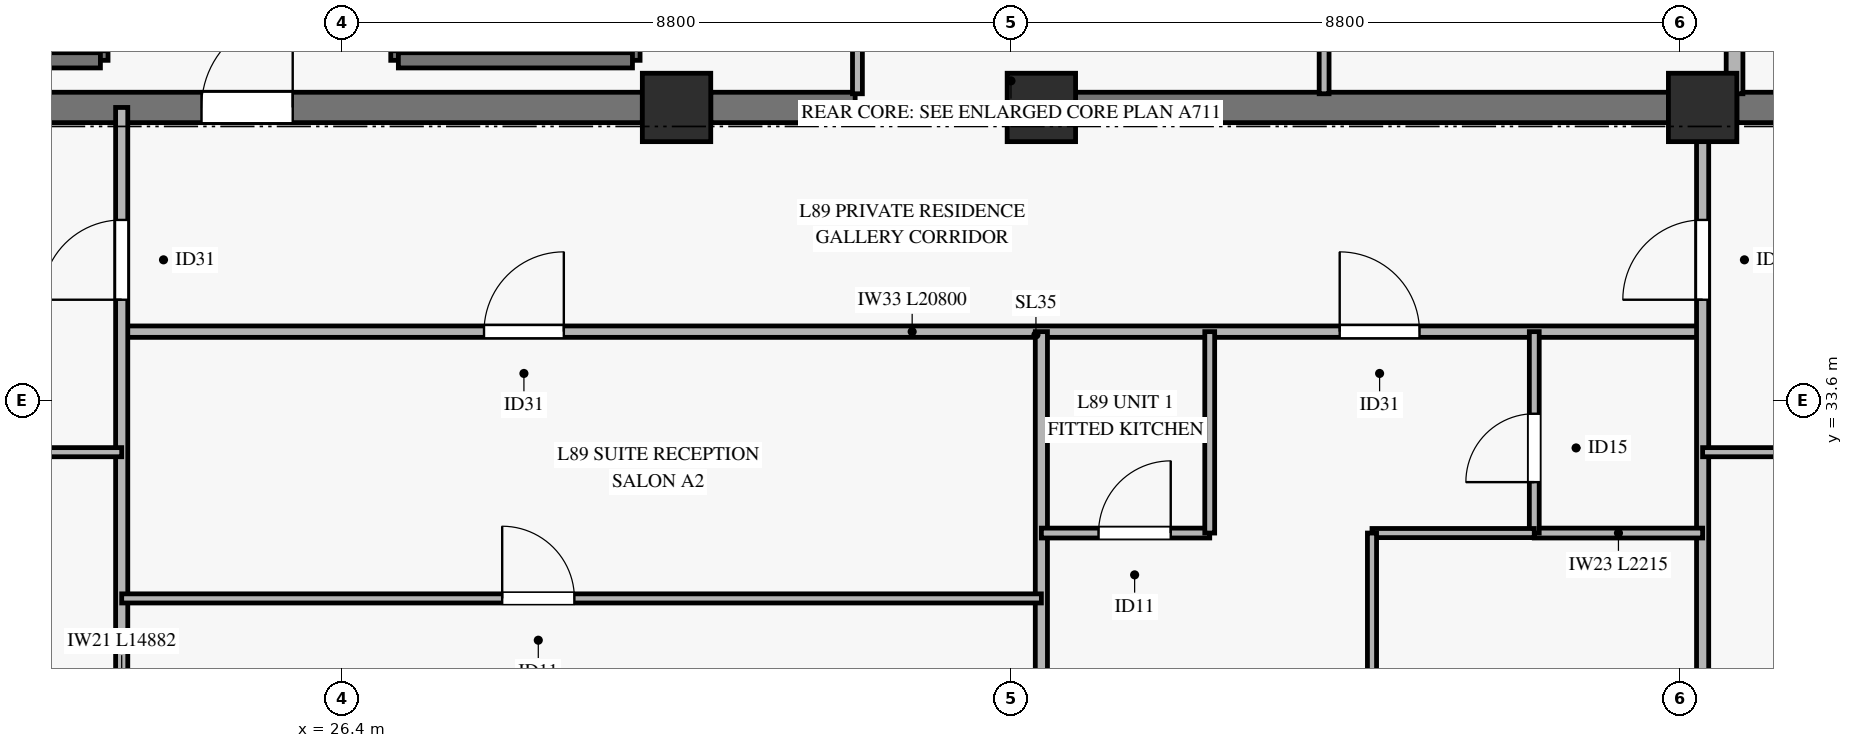
"""IFC4 building model, lengths in metres.
Left out: names, types, materials, properties, quantities, classifications, styles, units other than length and angle.
Written with IfcOpenShell. Run it as: python <this file> out.ifc"""

import sys

from ifc_helpers import new_model, si_unit, direction, frame, frame_2d, origin, origin_2d, place, context, subcontext, project, spatial, rectangle, extrude, source, transform, mapped, element, fill, save


model = new_model("IFC4")
c1 = context("Model", 3, precision=1e-05, world=origin(), true_north=direction((0.0, 1.0)))
c2 = subcontext(c1, "Body", "Model", "MODEL_VIEW")
j1 = project(units=[si_unit("LENGTHUNIT", "METRE"), si_unit("PLANEANGLEUNIT", "RADIAN")], contexts=[c1])
p1 = place(None, origin())
s1 = spatial("IfcSite", under=j1, at=p1, CompositionType="ELEMENT")
p2 = place(p1, origin())
s2 = spatial("IfcBuilding", under=s1, at=p2, CompositionType="ELEMENT")
p3 = place(p2, frame((0.0, 0.0, 342.5)))
s3 = spatial("IfcBuildingStorey", under=s2, at=p3, CompositionType="ELEMENT", Elevation=342.5)
m1 = source(origin(), c2, "Body", "SweptSolid", [
    extrude(rectangle(XDim=0.9, YDim=0.9, at=origin_2d()), origin(), (0.0, 0.0, 1.0), 3.185),
])
for number, where, z_axis, x_axis in (
    (1, (30.8, 37.45, 0.0), (0.0, 0.0, 1.0), (1.0, 0.0, 0.0)),
    (2, (35.6, 37.45, 0.0), (0.0, 0.0, 1.0), (1.0, 0.0, 0.0)),
    (3, (44.3, 37.45, 0.0), (0.0, 0.0, 1.0), (1.0, 0.0, 0.0)),
):
    element("IfcColumn", number, at=place(p3, frame(where, z_axis=z_axis, x_axis=x_axis)), inside=s3, PredefinedType="PILASTER", context=c2, shape_type="MappedRepresentation", body=[
        mapped(m1, transform((0.0, 0.0, 0.0), x_axis=(1.0, 0.0, 0.0), y_axis=(0.0, 1.0, 0.0), z_axis=(0.0, 0.0, 1.0), scale=1.0)),
    ])
p4 = place(p3, frame((20.3, 37.45, 0.0), z_axis=(0.0, 0.0, 1.0), x_axis=(1.0, 0.0, 0.0)))
e4 = element("IfcWall", 4, at=p4, inside=s3, PredefinedType="SHEAR", context=c2, shape_type="SweptSolid", body=[
    extrude(rectangle(XDim=10.05, YDim=0.4, at=frame_2d((5.025, 0.0))), origin(), (0.0, 0.0, 1.0), 3.185),
])
p5 = place(p4, frame((4.25, 0.0, 0.0)))
e5 = element("IfcOpeningElement", 5, at=p5, cuts=e4, PredefinedType="OPENING", context=c2, shape_type="SweptSolid", body=[
    extrude(rectangle(XDim=1.2, YDim=2.15, at=frame_2d((0.6, 1.075))), frame((0.0, 0.21, 0.0), z_axis=(0.0, -1.0, 0.0), x_axis=(1.0, 0.0, 0.0)), (0.0, 0.0, 1.0), 0.42),
])
p6 = place(p3, frame((31.25, 37.45, 0.0), z_axis=(0.0, 0.0, 1.0), x_axis=(1.0, 0.0, 0.0)))
e6 = element("IfcWall", 6, at=p6, inside=s3, PredefinedType="SHEAR", context=c2, shape_type="SweptSolid", body=[
    extrude(rectangle(XDim=1.9, YDim=0.4, at=frame_2d((0.95, 0.0))), origin(), (0.0, 0.0, 1.0), 3.185),
])
p7 = place(p3, frame((36.05, 37.45, 0.0), z_axis=(0.0, 0.0, 1.0), x_axis=(1.0, 0.0, 0.0)))
e7 = element("IfcWall", 7, at=p7, inside=s3, PredefinedType="SHEAR", context=c2, shape_type="SweptSolid", body=[
    extrude(rectangle(XDim=7.8, YDim=0.4, at=frame_2d((3.9, 0.0))), origin(), (0.0, 0.0, 1.0), 3.185),
])
p8 = place(p3, frame((44.75, 37.45, 0.0), z_axis=(0.0, 0.0, 1.0), x_axis=(1.0, 0.0, 0.0)))
e8 = element("IfcWall", 8, at=p8, inside=s3, PredefinedType="SHEAR", context=c2, shape_type="SweptSolid", body=[
    extrude(rectangle(XDim=5.35, YDim=0.4, at=frame_2d((2.675, 0.0))), origin(), (0.0, 0.0, 1.0), 3.185),
])
p9 = place(p8, frame((0.7, 0.0, 0.0)))
e9 = element("IfcOpeningElement", 9, at=p9, cuts=e8, PredefinedType="OPENING", context=c2, shape_type="SweptSolid", body=[
    extrude(rectangle(XDim=1.2, YDim=2.15, at=frame_2d((0.6, 1.075))), frame((0.0, 0.21, 0.0), z_axis=(0.0, -1.0, 0.0), x_axis=(1.0, 0.0, 0.0)), (0.0, 0.0, 1.0), 0.42),
])
p10 = place(p3, frame((23.22, 38.07, 0.0), z_axis=(0.0, 0.0, 1.0), x_axis=(0.0, 1.0, 0.0)))
e10 = element("IfcWall", 10, at=p10, inside=s3, PredefinedType="SOLIDWALL", context=c2, shape_type="SweptSolid", body=[
    extrude(rectangle(XDim=7.25, YDim=0.2, at=frame_2d((3.625, 0.0))), origin(), (0.0, 0.0, 1.0), 3.4),
])
p11 = place(p10, frame((0.11, 0.0, 0.0)))
e11 = element("IfcOpeningElement", 11, at=p11, cuts=e10, PredefinedType="OPENING", context=c2, shape_type="SweptSolid", body=[
    extrude(rectangle(XDim=1.1, YDim=2.15, at=frame_2d((0.55, 1.075))), frame((0.0, 0.11, 0.0), z_axis=(0.0, -1.0, 0.0), x_axis=(1.0, 0.0, 0.0)), (0.0, 0.0, 1.0), 0.22),
])
p12 = place(p3, frame((20.17, 38.07, 0.0), z_axis=(0.0, 0.0, 1.0), x_axis=(1.0, 0.0, 0.0)))
e12 = element("IfcWall", 12, at=p12, inside=s3, PredefinedType="SOLIDWALL", context=c2, shape_type="SweptSolid", body=[
    extrude(rectangle(XDim=3.05, YDim=0.2, at=frame_2d((1.525, 0.0))), origin(), (0.0, 0.0, 1.0), 3.4),
])
p13 = place(p3, frame((27.14, 38.07, 0.0), z_axis=(0.0, 0.0, 1.0), x_axis=(0.0, 1.0, 0.0)))
e13 = element("IfcWall", 13, at=p13, inside=s3, PredefinedType="SOLIDWALL", context=c2, shape_type="SweptSolid", body=[
    extrude(rectangle(XDim=7.25, YDim=0.2, at=frame_2d((3.625, 0.0))), origin(), (0.0, 0.0, 1.0), 3.4),
])
p14 = place(p13, frame((0.11, 0.0, 0.0)))
e14 = element("IfcOpeningElement", 14, at=p14, cuts=e13, PredefinedType="OPENING", context=c2, shape_type="SweptSolid", body=[
    extrude(rectangle(XDim=1.1, YDim=2.15, at=frame_2d((0.55, 1.075))), frame((0.0, 0.11, 0.0), z_axis=(0.0, -1.0, 0.0), x_axis=(1.0, 0.0, 0.0)), (0.0, 0.0, 1.0), 0.22),
])
p15 = place(p3, frame((30.22, 38.07, 0.0), z_axis=(0.0, 0.0, 1.0), x_axis=(0.0, 1.0, 0.0)))
e15 = element("IfcWall", 15, at=p15, inside=s3, PredefinedType="SOLIDWALL", context=c2, shape_type="SweptSolid", body=[
    extrude(rectangle(XDim=7.25, YDim=0.2, at=frame_2d((3.625, 0.0))), origin(), (0.0, 0.0, 1.0), 3.4),
])
p16 = place(p3, frame((27.14, 38.07, 0.0), z_axis=(0.0, 0.0, 1.0), x_axis=(1.0, 0.0, 0.0)))
e16 = element("IfcWall", 16, at=p16, inside=s3, PredefinedType="SOLIDWALL", context=c2, shape_type="SweptSolid", body=[
    extrude(rectangle(XDim=3.08, YDim=0.2, at=frame_2d((1.54, 0.0))), origin(), (0.0, 0.0, 1.0), 3.4),
])
p17 = place(p3, frame((44.72, 37.63, 0.0), z_axis=(0.0, 0.0, 1.0), x_axis=(0.0, 1.0, 0.0)))
e17 = element("IfcWall", 17, at=p17, inside=s3, PredefinedType="SOLIDWALL", context=c2, shape_type="SweptSolid", body=[
    extrude(rectangle(XDim=7.59, YDim=0.22, at=frame_2d((3.795, 0.0))), origin(), (0.0, 0.0, 1.0), 3.185),
])
p18 = place(p3, frame((33.18, 37.63, 0.0), z_axis=(0.0, 0.0, 1.0), x_axis=(0.0, 1.0, 0.0)))
e18 = element("IfcWall", 18, at=p18, inside=s3, PredefinedType="PARTITIONING", context=c2, shape_type="SweptSolid", body=[
    extrude(rectangle(XDim=6.52, YDim=0.13, at=frame_2d((3.26, 0.0))), origin(), (0.0, 0.0, 1.0), 2.27),
])
p19 = place(p18, frame((1.32, 0.0, 0.0)))
e19 = element("IfcOpeningElement", 19, at=p19, cuts=e18, PredefinedType="OPENING", context=c2, shape_type="SweptSolid", body=[
    extrude(rectangle(XDim=0.9, YDim=2.1, at=frame_2d((0.45, 1.05))), frame((0.0, 0.075, 0.0), z_axis=(0.0, -1.0, 0.0), x_axis=(1.0, 0.0, 0.0)), (0.0, 0.0, 1.0), 0.15),
])
p20 = place(p18, frame((4.62, 0.0, 0.0)))
e20 = element("IfcOpeningElement", 20, at=p20, cuts=e18, PredefinedType="OPENING", context=c2, shape_type="SweptSolid", body=[
    extrude(rectangle(XDim=0.9, YDim=2.1, at=frame_2d((0.45, 1.05))), frame((0.0, 0.075, 0.0), z_axis=(0.0, -1.0, 0.0), x_axis=(1.0, 0.0, 0.0)), (0.0, 0.0, 1.0), 0.15),
])
p21 = place(p3, frame((39.32, 37.63, 0.0), z_axis=(0.0, 0.0, 1.0), x_axis=(0.0, 1.0, 0.0)))
e21 = element("IfcWall", 21, at=p21, inside=s3, PredefinedType="PARTITIONING", context=c2, shape_type="SweptSolid", body=[
    extrude(rectangle(XDim=8.74, YDim=0.13, at=frame_2d((4.37, 0.0))), origin(), (0.0, 0.0, 1.0), 3.185),
])
p22 = place(p21, frame((4.89, 0.0, 0.0)))
e22 = element("IfcOpeningElement", 22, at=p22, cuts=e21, PredefinedType="OPENING", context=c2, shape_type="SweptSolid", body=[
    extrude(rectangle(XDim=0.9, YDim=2.1, at=frame_2d((0.45, 1.05))), frame((0.0, 0.075, 0.0), z_axis=(0.0, -1.0, 0.0), x_axis=(1.0, 0.0, 0.0)), (0.0, 0.0, 1.0), 0.15),
])
p23 = place(p3, frame((23.5, 34.5, 0.0), z_axis=(0.0, 0.0, 1.0), x_axis=(1.0, 0.0, 0.0)))
e23 = element("IfcWall", 23, at=p23, inside=s3, PredefinedType="PARTITIONING", context=c2, shape_type="SweptSolid", body=[
    extrude(rectangle(XDim=20.8, YDim=0.15, at=frame_2d((10.4, 0.0))), origin(), (0.0, 0.0, 1.0), 2.47),
])
p24 = place(p23, frame((4.767, 0.0, 0.0)))
e24 = element("IfcOpeningElement", 24, at=p24, cuts=e23, PredefinedType="OPENING", context=c2, shape_type="SweptSolid", body=[
    extrude(rectangle(XDim=1.05, YDim=2.15, at=frame_2d((0.525, 1.075))), frame((0.0, 0.085, 0.0), z_axis=(0.0, -1.0, 0.0), x_axis=(1.0, 0.0, 0.0)), (0.0, 0.0, 1.0), 0.17),
])
p25 = place(p23, frame((16.025, 0.0, 0.0)))
e25 = element("IfcOpeningElement", 25, at=p25, cuts=e23, PredefinedType="OPENING", context=c2, shape_type="SweptSolid", body=[
    extrude(rectangle(XDim=1.05, YDim=2.15, at=frame_2d((0.525, 1.075))), frame((0.0, 0.085, 0.0), z_axis=(0.0, -1.0, 0.0), x_axis=(1.0, 0.0, 0.0)), (0.0, 0.0, 1.0), 0.17),
])
p26 = place(p3, frame((23.5, 22.568, 0.0), z_axis=(0.0, 0.0, 1.0), x_axis=(0.0, 1.0, 0.0)))
e26 = element("IfcWall", 26, at=p26, inside=s3, PredefinedType="PARTITIONING", context=c2, shape_type="SweptSolid", body=[
    extrude(rectangle(XDim=14.882, YDim=0.16, at=frame_2d((7.441, 0.0))), origin(), (0.0, 0.0, 1.0), 2.77),
])
p27 = place(p26, frame((12.352, 0.0, 0.0)))
e27 = element("IfcOpeningElement", 27, at=p27, cuts=e26, PredefinedType="OPENING", context=c2, shape_type="SweptSolid", body=[
    extrude(rectangle(XDim=1.05, YDim=2.15, at=frame_2d((0.525, 1.075))), frame((0.0, 0.09, 0.0), z_axis=(0.0, -1.0, 0.0), x_axis=(1.0, 0.0, 0.0)), (0.0, 0.0, 1.0), 0.18),
])
p28 = place(p3, frame((35.6, 22.568, 0.0), z_axis=(0.0, 0.0, 1.0), x_axis=(0.0, 1.0, 0.0)))
e28 = element("IfcWall", 28, at=p28, inside=s3, PredefinedType="PARTITIONING", context=c2, shape_type="SweptSolid", body=[
    extrude(rectangle(XDim=11.932, YDim=0.16, at=frame_2d((5.966, 0.0))), origin(), (0.0, 0.0, 1.0), 2.77),
])
p29 = place(p3, frame((44.3, 22.568, 0.0), z_axis=(0.0, 0.0, 1.0), x_axis=(0.0, 1.0, 0.0)))
e29 = element("IfcWall", 29, at=p29, inside=s3, PredefinedType="PARTITIONING", context=c2, shape_type="SweptSolid", body=[
    extrude(rectangle(XDim=14.882, YDim=0.16, at=frame_2d((7.441, 0.0))), origin(), (0.0, 0.0, 1.0), 2.47),
])
p30 = place(p29, frame((12.352, 0.0, 0.0)))
e30 = element("IfcOpeningElement", 30, at=p30, cuts=e29, PredefinedType="OPENING", context=c2, shape_type="SweptSolid", body=[
    extrude(rectangle(XDim=1.05, YDim=2.15, at=frame_2d((0.525, 1.075))), frame((0.0, 0.09, 0.0), z_axis=(0.0, -1.0, 0.0), x_axis=(1.0, 0.0, 0.0)), (0.0, 0.0, 1.0), 0.18),
])
p31 = place(p3, frame((11.685, 32.914, 0.0), z_axis=(0.0, 0.0, 1.0), x_axis=(1.0, 0.0, 0.0)))
e31 = element("IfcWall", 31, at=p31, inside=s3, PredefinedType="PARTITIONING", context=c2, shape_type="SweptSolid", body=[
    extrude(rectangle(XDim=11.815, YDim=0.12, at=frame_2d((5.907, 0.0))), origin(), (0.0, 0.0, 1.0), 2.47),
])
p32 = place(p31, frame((5.261, 0.0, 0.0)))
e32 = element("IfcOpeningElement", 32, at=p32, cuts=e31, PredefinedType="OPENING", context=c2, shape_type="SweptSolid", body=[
    extrude(rectangle(XDim=0.95, YDim=2.1, at=frame_2d((0.475, 1.05))), frame((0.0, 0.07, 0.0), z_axis=(0.0, -1.0, 0.0), x_axis=(1.0, 0.0, 0.0)), (0.0, 0.0, 1.0), 0.14),
])
p33 = place(p3, frame((23.5, 30.99, 0.0), z_axis=(0.0, 0.0, 1.0), x_axis=(1.0, 0.0, 0.0)))
e33 = element("IfcWall", 33, at=p33, inside=s3, PredefinedType="PARTITIONING", context=c2, shape_type="SweptSolid", body=[
    extrude(rectangle(XDim=12.1, YDim=0.12, at=frame_2d((6.05, 0.0))), origin(), (0.0, 0.0, 1.0), 2.47),
])
p34 = place(p33, frame((5.006, 0.0, 0.0)))
e34 = element("IfcOpeningElement", 34, at=p34, cuts=e33, PredefinedType="OPENING", context=c2, shape_type="SweptSolid", body=[
    extrude(rectangle(XDim=0.95, YDim=2.1, at=frame_2d((0.475, 1.05))), frame((0.0, 0.07, 0.0), z_axis=(0.0, -1.0, 0.0), x_axis=(1.0, 0.0, 0.0)), (0.0, 0.0, 1.0), 0.14),
])
p35 = place(p3, frame((35.6, 31.85, 0.0), z_axis=(0.0, 0.0, 1.0), x_axis=(1.0, 0.0, 0.0)))
e35 = element("IfcWall", 35, at=p35, inside=s3, PredefinedType="PARTITIONING", context=c2, shape_type="SweptSolid", body=[
    extrude(rectangle(XDim=2.215, YDim=0.13, at=frame_2d((1.107, 0.0))), origin(), (0.0, 0.0, 1.0), 2.47),
])
p36 = place(p35, frame((0.752, 0.0, 0.0)))
e36 = element("IfcOpeningElement", 36, at=p36, cuts=e35, PredefinedType="OPENING", context=c2, shape_type="SweptSolid", body=[
    extrude(rectangle(XDim=0.95, YDim=2.1, at=frame_2d((0.475, 1.05))), frame((0.0, 0.075, 0.0), z_axis=(0.0, -1.0, 0.0), x_axis=(1.0, 0.0, 0.0)), (0.0, 0.0, 1.0), 0.15),
])
p37 = place(p3, frame((37.815, 31.85, 0.0), z_axis=(0.0, 0.0, 1.0), x_axis=(0.0, 1.0, 0.0)))
e37 = element("IfcWall", 37, at=p37, inside=s3, PredefinedType="PARTITIONING", context=c2, shape_type="SweptSolid", body=[
    extrude(rectangle(XDim=2.65, YDim=0.13, at=frame_2d((1.325, 0.0))), origin(), (0.0, 0.0, 1.0), 2.77),
])
p38 = place(p3, frame((42.085, 31.85, 0.0), z_axis=(0.0, 0.0, 1.0), x_axis=(1.0, 0.0, 0.0)))
e38 = element("IfcWall", 38, at=p38, inside=s3, PredefinedType="PARTITIONING", context=c2, shape_type="SweptSolid", body=[
    extrude(rectangle(XDim=2.215, YDim=0.13, at=frame_2d((1.107, 0.0))), origin(), (0.0, 0.0, 1.0), 2.47),
])
p39 = place(p3, frame((42.085, 31.85, 0.0), z_axis=(0.0, 0.0, 1.0), x_axis=(0.0, 1.0, 0.0)))
e39 = element("IfcWall", 39, at=p39, inside=s3, PredefinedType="PARTITIONING", context=c2, shape_type="SweptSolid", body=[
    extrude(rectangle(XDim=2.65, YDim=0.13, at=frame_2d((1.325, 0.0))), origin(), (0.0, 0.0, 1.0), 2.77),
])
p40 = place(p39, frame((0.67, 0.0, 0.0)))
e40 = element("IfcOpeningElement", 40, at=p40, cuts=e39, PredefinedType="OPENING", context=c2, shape_type="SweptSolid", body=[
    extrude(rectangle(XDim=0.9, YDim=2.1, at=frame_2d((0.45, 1.05))), frame((0.0, 0.075, 0.0), z_axis=(0.0, -1.0, 0.0), x_axis=(1.0, 0.0, 0.0)), (0.0, 0.0, 1.0), 0.15),
])
p41 = place(p3, frame((39.95, 31.85, 0.0), z_axis=(0.0, 0.0, 1.0), x_axis=(1.0, 0.0, 0.0)))
e41 = element("IfcWall", 41, at=p41, inside=s3, PredefinedType="PARTITIONING", context=c2, shape_type="SweptSolid", body=[
    extrude(rectangle(XDim=2.135, YDim=0.12, at=frame_2d((1.067, 0.0))), origin(), (0.0, 0.0, 1.0), 3.185),
])
p42 = place(p3, frame((39.95, 22.568, 0.0), z_axis=(0.0, 0.0, 1.0), x_axis=(0.0, 1.0, 0.0)))
e42 = element("IfcWall", 42, at=p42, inside=s3, PredefinedType="PARTITIONING", context=c2, shape_type="SweptSolid", body=[
    extrude(rectangle(XDim=9.282, YDim=0.12, at=frame_2d((4.641, 0.0))), origin(), (0.0, 0.0, 1.0), 2.77),
])
p43 = place(p42, frame((2.652, 0.0, 0.0)))
e43 = element("IfcOpeningElement", 43, at=p43, cuts=e42, PredefinedType="OPENING", context=c2, shape_type="SweptSolid", body=[
    extrude(rectangle(XDim=0.95, YDim=2.1, at=frame_2d((0.475, 1.05))), frame((0.0, 0.07, 0.0), z_axis=(0.0, -1.0, 0.0), x_axis=(1.0, 0.0, 0.0)), (0.0, 0.0, 1.0), 0.14),
])
p44 = place(p3, frame((44.3, 32.914, 0.0), z_axis=(0.0, 0.0, 1.0), x_axis=(1.0, 0.0, 0.0)))
e44 = element("IfcWall", 44, at=p44, inside=s3, PredefinedType="PARTITIONING", context=c2, shape_type="SweptSolid", body=[
    extrude(rectangle(XDim=14.415, YDim=0.12, at=frame_2d((7.208, 0.0))), origin(), (0.0, 0.0, 1.0), 2.47),
])
p45 = place(p44, frame((5.686, 0.0, 0.0)))
e45 = element("IfcOpeningElement", 45, at=p45, cuts=e44, PredefinedType="OPENING", context=c2, shape_type="SweptSolid", body=[
    extrude(rectangle(XDim=0.95, YDim=2.1, at=frame_2d((0.475, 1.05))), frame((0.0, 0.07, 0.0), z_axis=(0.0, -1.0, 0.0), x_axis=(1.0, 0.0, 0.0)), (0.0, 0.0, 1.0), 0.14),
])
m2 = source(origin(), c2, "Body", "SweptSolid", [
    extrude(rectangle(XDim=1.2, YDim=2.15, at=frame_2d((0.6, 1.075))), frame((0.0, 0.025, 0.0), z_axis=(0.0, -1.0, 0.0), x_axis=(1.0, 0.0, 0.0)), (0.0, 0.0, 1.0), 0.05),
])
p46 = place(p5, origin())
e46 = element("IfcDoor", 46, at=p46, inside=s3, OperationType="SINGLE_SWING_RIGHT", PredefinedType="DOOR", context=c2, shape_type="MappedRepresentation", body=[
    mapped(m2, transform((0.0, 0.0, 0.0), x_axis=(1.0, 0.0, 0.0), y_axis=(0.0, 1.0, 0.0), z_axis=(0.0, 0.0, 1.0), scale=1.0)),
])
fill(e5, e46)
m3 = source(origin(), c2, "Body", "SweptSolid", [
    extrude(rectangle(XDim=1.05, YDim=2.15, at=frame_2d((0.525, 1.075))), frame((0.0, 0.025, 0.0), z_axis=(0.0, -1.0, 0.0), x_axis=(1.0, 0.0, 0.0)), (0.0, 0.0, 1.0), 0.05),
])
p47 = place(p27, origin())
e47 = element("IfcDoor", 47, at=p47, inside=s3, OperationType="SINGLE_SWING_LEFT", PredefinedType="DOOR", context=c2, shape_type="MappedRepresentation", body=[
    mapped(m3, transform((0.0, 0.0, 0.0), x_axis=(1.0, 0.0, 0.0), y_axis=(0.0, 1.0, 0.0), z_axis=(0.0, 0.0, 1.0), scale=1.0)),
])
fill(e27, e47)
p48 = place(p24, origin())
e48 = element("IfcDoor", 48, at=p48, inside=s3, OperationType="SINGLE_SWING_RIGHT", PredefinedType="DOOR", context=c2, shape_type="MappedRepresentation", body=[
    mapped(m3, transform((0.0, 0.0, 0.0), x_axis=(1.0, 0.0, 0.0), y_axis=(0.0, 1.0, 0.0), z_axis=(0.0, 0.0, 1.0), scale=1.0)),
])
fill(e24, e48)
m4 = source(origin(), c2, "Body", "SweptSolid", [
    extrude(rectangle(XDim=0.95, YDim=2.1, at=frame_2d((0.475, 1.05))), frame((0.0, 0.025, 0.0), z_axis=(0.0, -1.0, 0.0), x_axis=(1.0, 0.0, 0.0)), (0.0, 0.0, 1.0), 0.05),
])
p49 = place(p34, origin())
e49 = element("IfcDoor", 49, at=p49, inside=s3, OperationType="SINGLE_SWING_LEFT", PredefinedType="DOOR", context=c2, shape_type="MappedRepresentation", body=[
    mapped(m4, transform((0.0, 0.0, 0.0), x_axis=(1.0, 0.0, 0.0), y_axis=(0.0, 1.0, 0.0), z_axis=(0.0, 0.0, 1.0), scale=1.0)),
])
fill(e34, e49)
p50 = place(p25, origin())
e50 = element("IfcDoor", 50, at=p50, inside=s3, OperationType="SINGLE_SWING_LEFT", PredefinedType="DOOR", context=c2, shape_type="MappedRepresentation", body=[
    mapped(m3, transform((0.0, 0.0, 0.0), x_axis=(1.0, 0.0, 0.0), y_axis=(0.0, 1.0, 0.0), z_axis=(0.0, 0.0, 1.0), scale=1.0)),
])
fill(e25, e50)
p51 = place(p36, origin())
e51 = element("IfcDoor", 51, at=p51, inside=s3, OperationType="SINGLE_SWING_RIGHT", PredefinedType="DOOR", context=c2, shape_type="MappedRepresentation", body=[
    mapped(m4, transform((0.0, 0.0, 0.0), x_axis=(1.0, 0.0, 0.0), y_axis=(0.0, 1.0, 0.0), z_axis=(0.0, 0.0, 1.0), scale=1.0)),
])
fill(e36, e51)
m5 = source(origin(), c2, "Body", "SweptSolid", [
    extrude(rectangle(XDim=0.9, YDim=2.1, at=frame_2d((0.45, 1.05))), frame((0.0, 0.025, 0.0), z_axis=(0.0, -1.0, 0.0), x_axis=(1.0, 0.0, 0.0)), (0.0, 0.0, 1.0), 0.05),
])
p52 = place(p40, origin())
e52 = element("IfcDoor", 52, at=p52, inside=s3, OperationType="SINGLE_SWING_LEFT", PredefinedType="DOOR", context=c2, shape_type="MappedRepresentation", body=[
    mapped(m5, transform((0.0, 0.0, 0.0), x_axis=(1.0, 0.0, 0.0), y_axis=(0.0, 1.0, 0.0), z_axis=(0.0, 0.0, 1.0), scale=1.0)),
])
fill(e40, e52)
p53 = place(p30, origin())
e53 = element("IfcDoor", 53, at=p53, inside=s3, OperationType="SINGLE_SWING_LEFT", PredefinedType="DOOR", context=c2, shape_type="MappedRepresentation", body=[
    mapped(m3, transform((0.0, 0.0, 0.0), x_axis=(1.0, 0.0, 0.0), y_axis=(0.0, 1.0, 0.0), z_axis=(0.0, 0.0, 1.0), scale=1.0)),
])
fill(e30, e53)
save(model, sys.argv[1])
